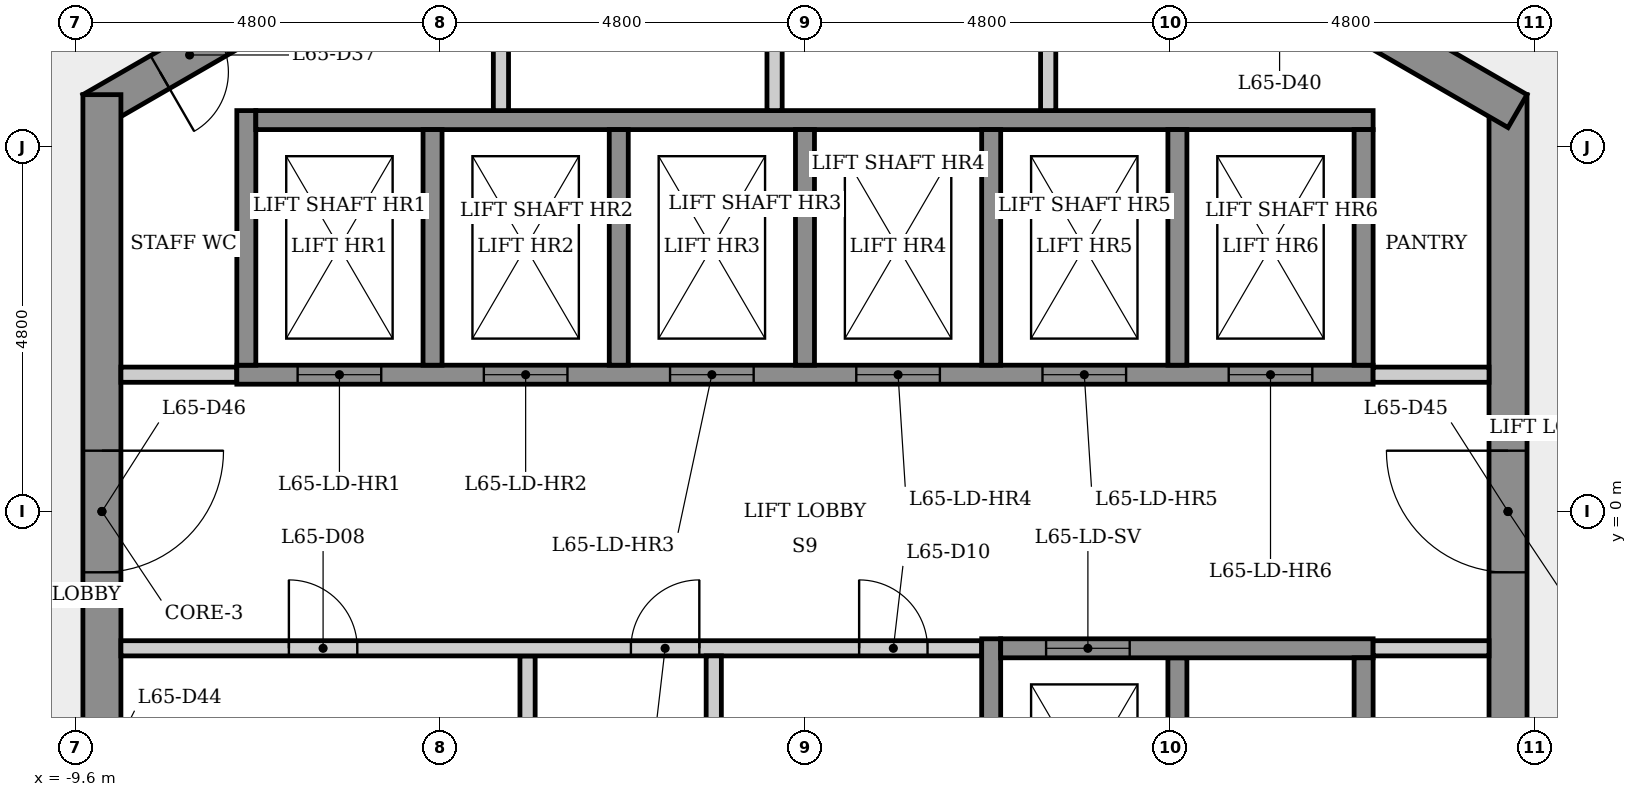
"""IFC4 building model, lengths in metres.
Left out: names, types, materials, properties, quantities, classifications, styles, units other than length and angle.
Written with IfcOpenShell. Run it as: python <this file> out.ifc"""

import sys

from ifc_helpers import new_model, si_unit, direction, frame, frame_2d, origin, place, context, subcontext, project, spatial, rectangle, extrude, element, fill, save


model = new_model("IFC4")
c1 = context("Model", 3, precision=1e-05, world=origin(), true_north=direction((0.0, 1.0)))
c2 = subcontext(c1, "Body", "Model", "MODEL_VIEW")
j1 = project(units=[si_unit("LENGTHUNIT", "METRE"), si_unit("PLANEANGLEUNIT", "RADIAN")], contexts=[c1])
p1 = place(None, origin())
s1 = spatial("IfcSite", under=j1, at=p1, CompositionType="ELEMENT")
p2 = place(p1, origin())
s2 = spatial("IfcBuilding", under=s1, at=p2, CompositionType="ELEMENT")
p3 = place(p2, frame((0.0, 0.0, 242.7)))
s3 = spatial("IfcBuildingStorey", under=s2, at=p3, CompositionType="ELEMENT", Elevation=242.7)
p4 = place(p3, frame((9.25, -5.485, 0.0), z_axis=(0.0, 0.0, 1.0), x_axis=(0.0, 1.0, 0.0)))
e1 = element("IfcWall", 1, at=p4, inside=s3, PredefinedType="SHEAR", context=c2, shape_type="SweptSolid", body=[
    extrude(rectangle(XDim=10.97, YDim=0.5, at=frame_2d((5.485, 0.0))), origin(), (0.0, 0.0, 1.0), 3.4),
])
p5 = place(p4, frame((4.685, 0.0, 0.0)))
e2 = element("IfcOpeningElement", 2, at=p5, cuts=e1, PredefinedType="OPENING", context=c2, shape_type="SweptSolid", body=[
    extrude(rectangle(XDim=1.6, YDim=2.1, at=frame_2d((0.8, 1.05))), frame((0.0, 0.26, 0.0), z_axis=(0.0, -1.0, 0.0), x_axis=(1.0, 0.0, 0.0)), (0.0, 0.0, 1.0), 0.52),
])
p6 = place(p3, frame((9.375, 5.268, 0.0), z_axis=(0.0, 0.0, 1.0), x_axis=(-0.866023993627, 0.500002442456, 0.0)))
e3 = element("IfcWall", 3, at=p6, inside=s3, PredefinedType="SHEAR", context=c2, shape_type="SweptSolid", body=[
    extrude(rectangle(XDim=10.97, YDim=0.5, at=frame_2d((5.485, 0.0))), origin(), (0.0, 0.0, 1.0), 3.4),
])
p7 = place(p6, frame((8.383, 0.0, 0.0)))
e4 = element("IfcOpeningElement", 4, at=p7, cuts=e3, PredefinedType="OPENING", context=c2, shape_type="SweptSolid", body=[
    extrude(rectangle(XDim=0.9, YDim=2.1, at=frame_2d((0.45, 1.05))), frame((0.0, 0.26, 0.0), z_axis=(0.0, -1.0, 0.0), x_axis=(1.0, 0.0, 0.0)), (0.0, 0.0, 1.0), 0.52),
])
p8 = place(p6, frame((3.165, 0.0, 0.0)))
e5 = element("IfcOpeningElement", 5, at=p8, cuts=e3, PredefinedType="OPENING", context=c2, shape_type="SweptSolid", body=[
    extrude(rectangle(XDim=0.9, YDim=2.1, at=frame_2d((0.45, 1.05))), frame((0.0, 0.26, 0.0), z_axis=(0.0, -1.0, 0.0), x_axis=(1.0, 0.0, 0.0)), (0.0, 0.0, 1.0), 0.52),
])
p9 = place(p3, frame((0.125, 10.753, 0.0), z_axis=(0.0, 0.0, 1.0), x_axis=(-0.866023993627, -0.500002442456, 0.0)))
e6 = element("IfcWall", 6, at=p9, inside=s3, PredefinedType="SHEAR", context=c2, shape_type="SweptSolid", body=[
    extrude(rectangle(XDim=10.97, YDim=0.5, at=frame_2d((5.485, 0.0))), origin(), (0.0, 0.0, 1.0), 3.4),
])
p10 = place(p9, frame((9.043, 0.0, 0.0)))
e7 = element("IfcOpeningElement", 7, at=p10, cuts=e6, PredefinedType="OPENING", context=c2, shape_type="SweptSolid", body=[
    extrude(rectangle(XDim=0.9, YDim=2.1, at=frame_2d((0.45, 1.05))), frame((0.0, 0.26, 0.0), z_axis=(0.0, -1.0, 0.0), x_axis=(1.0, 0.0, 0.0)), (0.0, 0.0, 1.0), 0.52),
])
p11 = place(p9, frame((2.38, 0.0, 0.0)))
e8 = element("IfcOpeningElement", 8, at=p11, cuts=e6, PredefinedType="OPENING", context=c2, shape_type="SweptSolid", body=[
    extrude(rectangle(XDim=0.9, YDim=2.1, at=frame_2d((0.45, 1.05))), frame((0.0, 0.26, 0.0), z_axis=(0.0, -1.0, 0.0), x_axis=(1.0, 0.0, 0.0)), (0.0, 0.0, 1.0), 0.52),
])
p12 = place(p3, frame((-9.25, 5.485, 0.0), z_axis=(0.0, 0.0, 1.0), x_axis=(0.0, -1.0, 0.0)))
e9 = element("IfcWall", 9, at=p12, inside=s3, PredefinedType="SHEAR", context=c2, shape_type="SweptSolid", body=[
    extrude(rectangle(XDim=10.97, YDim=0.5, at=frame_2d((5.485, 0.0))), origin(), (0.0, 0.0, 1.0), 3.4),
])
p13 = place(p12, frame((8.51, 0.0, 0.0)))
e10 = element("IfcOpeningElement", 10, at=p13, cuts=e9, PredefinedType="OPENING", context=c2, shape_type="SweptSolid", body=[
    extrude(rectangle(XDim=0.9, YDim=2.1, at=frame_2d((0.45, 1.05))), frame((0.0, 0.26, 0.0), z_axis=(0.0, -1.0, 0.0), x_axis=(1.0, 0.0, 0.0)), (0.0, 0.0, 1.0), 0.52),
])
p14 = place(p12, frame((4.685, 0.0, 0.0)))
e11 = element("IfcOpeningElement", 11, at=p14, cuts=e9, PredefinedType="OPENING", context=c2, shape_type="SweptSolid", body=[
    extrude(rectangle(XDim=1.6, YDim=2.1, at=frame_2d((0.8, 1.05))), frame((0.0, 0.26, 0.0), z_axis=(0.0, -1.0, 0.0), x_axis=(1.0, 0.0, 0.0)), (0.0, 0.0, 1.0), 0.52),
])
p15 = place(p3, frame((-9.0, 1.8, 0.0), z_axis=(0.0, 0.0, 1.0), x_axis=(1.0, 0.0, 0.0)))
e12 = element("IfcWall", 12, at=p15, inside=s3, PredefinedType="PARTITIONING", context=c2, shape_type="SweptSolid", body=[
    extrude(rectangle(XDim=1.525, YDim=0.2, at=frame_2d((0.763, 0.0))), origin(), (0.0, 0.0, 1.0), 3.05),
])
p16 = place(p3, frame((-7.475, 1.8, 0.0), z_axis=(0.0, 0.0, 1.0), x_axis=(1.0, 0.0, 0.0)))
e13 = element("IfcWall", 13, at=p16, inside=s3, PredefinedType="SHEAR", context=c2, shape_type="SweptSolid", body=[
    extrude(rectangle(XDim=14.95, YDim=0.25, at=frame_2d((7.475, 0.0))), origin(), (0.0, 0.0, 1.0), 3.05),
])
p17 = place(p16, frame((0.8, 0.0, 0.0)))
e14 = element("IfcOpeningElement", 14, at=p17, cuts=e13, PredefinedType="OPENING", context=c2, shape_type="SweptSolid", body=[
    extrude(rectangle(XDim=1.1, YDim=2.1, at=frame_2d((0.55, 1.05))), frame((0.0, 0.135, 0.0), z_axis=(0.0, -1.0, 0.0), x_axis=(1.0, 0.0, 0.0)), (0.0, 0.0, 1.0), 0.27),
])
p18 = place(p16, frame((3.25, 0.0, 0.0)))
e15 = element("IfcOpeningElement", 15, at=p18, cuts=e13, PredefinedType="OPENING", context=c2, shape_type="SweptSolid", body=[
    extrude(rectangle(XDim=1.1, YDim=2.1, at=frame_2d((0.55, 1.05))), frame((0.0, 0.135, 0.0), z_axis=(0.0, -1.0, 0.0), x_axis=(1.0, 0.0, 0.0)), (0.0, 0.0, 1.0), 0.27),
])
p19 = place(p16, frame((5.7, 0.0, 0.0)))
e16 = element("IfcOpeningElement", 16, at=p19, cuts=e13, PredefinedType="OPENING", context=c2, shape_type="SweptSolid", body=[
    extrude(rectangle(XDim=1.1, YDim=2.1, at=frame_2d((0.55, 1.05))), frame((0.0, 0.135, 0.0), z_axis=(0.0, -1.0, 0.0), x_axis=(1.0, 0.0, 0.0)), (0.0, 0.0, 1.0), 0.27),
])
p20 = place(p16, frame((8.15, 0.0, 0.0)))
e17 = element("IfcOpeningElement", 17, at=p20, cuts=e13, PredefinedType="OPENING", context=c2, shape_type="SweptSolid", body=[
    extrude(rectangle(XDim=1.1, YDim=2.1, at=frame_2d((0.55, 1.05))), frame((0.0, 0.135, 0.0), z_axis=(0.0, -1.0, 0.0), x_axis=(1.0, 0.0, 0.0)), (0.0, 0.0, 1.0), 0.27),
])
p21 = place(p16, frame((10.6, 0.0, 0.0)))
e18 = element("IfcOpeningElement", 18, at=p21, cuts=e13, PredefinedType="OPENING", context=c2, shape_type="SweptSolid", body=[
    extrude(rectangle(XDim=1.1, YDim=2.1, at=frame_2d((0.55, 1.05))), frame((0.0, 0.135, 0.0), z_axis=(0.0, -1.0, 0.0), x_axis=(1.0, 0.0, 0.0)), (0.0, 0.0, 1.0), 0.27),
])
p22 = place(p16, frame((13.05, 0.0, 0.0)))
e19 = element("IfcOpeningElement", 19, at=p22, cuts=e13, PredefinedType="OPENING", context=c2, shape_type="SweptSolid", body=[
    extrude(rectangle(XDim=1.1, YDim=2.1, at=frame_2d((0.55, 1.05))), frame((0.0, 0.135, 0.0), z_axis=(0.0, -1.0, 0.0), x_axis=(1.0, 0.0, 0.0)), (0.0, 0.0, 1.0), 0.27),
])
p23 = place(p3, frame((-7.35, 1.925, 0.0), z_axis=(0.0, 0.0, 1.0), x_axis=(0.0, 1.0, 0.0)))
e20 = element("IfcWall", 20, at=p23, inside=s3, PredefinedType="SHEAR", context=c2, shape_type="SweptSolid", body=[
    extrude(rectangle(XDim=3.35, YDim=0.25, at=frame_2d((1.675, 0.0))), origin(), (0.0, 0.0, 1.0), 3.05),
])
p24 = place(p3, frame((-7.225, 5.15, 0.0), z_axis=(0.0, 0.0, 1.0), x_axis=(1.0, 0.0, 0.0)))
e21 = element("IfcWall", 21, at=p24, inside=s3, PredefinedType="SHEAR", context=c2, shape_type="SweptSolid", body=[
    extrude(rectangle(XDim=14.7, YDim=0.25, at=frame_2d((7.35, 0.0))), origin(), (0.0, 0.0, 1.0), 3.05),
])
p25 = place(p3, frame((-4.9, 5.025, 0.0), z_axis=(0.0, 0.0, 1.0), x_axis=(0.0, -1.0, 0.0)))
e22 = element("IfcWall", 22, at=p25, inside=s3, PredefinedType="SHEAR", context=c2, shape_type="SweptSolid", body=[
    extrude(rectangle(XDim=3.1, YDim=0.25, at=frame_2d((1.55, 0.0))), origin(), (0.0, 0.0, 1.0), 3.4),
])
p26 = place(p3, frame((-4.0, 8.083, 0.0), z_axis=(0.0, 0.0, 1.0), x_axis=(0.0, -1.0, 0.0)))
e23 = element("IfcWall", 23, at=p26, inside=s3, PredefinedType="PARTITIONING", context=c2, shape_type="SweptSolid", body=[
    extrude(rectangle(XDim=2.808, YDim=0.2, at=frame_2d((1.404, 0.0))), origin(), (0.0, 0.0, 1.0), 3.05),
])
p27 = place(p3, frame((-3.65, -1.9, 0.0), z_axis=(0.0, 0.0, 1.0), x_axis=(0.0, -1.0, 0.0)))
e24 = element("IfcWall", 24, at=p27, inside=s3, PredefinedType="PARTITIONING", context=c2, shape_type="SweptSolid", body=[
    extrude(rectangle(XDim=3.15, YDim=0.2, at=frame_2d((1.575, 0.0))), origin(), (0.0, 0.0, 1.0), 3.05),
])
p28 = place(p3, frame((-9.0, -1.8, 0.0), z_axis=(0.0, 0.0, 1.0), x_axis=(1.0, 0.0, 0.0)))
e25 = element("IfcWall", 25, at=p28, inside=s3, PredefinedType="PARTITIONING", context=c2, shape_type="SweptSolid", body=[
    extrude(rectangle(XDim=11.325, YDim=0.2, at=frame_2d((5.663, 0.0))), origin(), (0.0, 0.0, 1.0), 3.05),
])
p29 = place(p28, frame((2.21, 0.0, 0.0)))
e26 = element("IfcOpeningElement", 26, at=p29, cuts=e25, PredefinedType="OPENING", context=c2, shape_type="SweptSolid", body=[
    extrude(rectangle(XDim=0.9, YDim=2.1, at=frame_2d((0.45, 1.05))), frame((0.0, 0.11, 0.0), z_axis=(0.0, -1.0, 0.0), x_axis=(1.0, 0.0, 0.0)), (0.0, 0.0, 1.0), 0.22),
])
p30 = place(p28, frame((6.71, 0.0, 0.0)))
e27 = element("IfcOpeningElement", 27, at=p30, cuts=e25, PredefinedType="OPENING", context=c2, shape_type="SweptSolid", body=[
    extrude(rectangle(XDim=0.9, YDim=2.1, at=frame_2d((0.45, 1.05))), frame((0.0, 0.11, 0.0), z_axis=(0.0, -1.0, 0.0), x_axis=(1.0, 0.0, 0.0)), (0.0, 0.0, 1.0), 0.22),
])
p31 = place(p28, frame((9.713, 0.0, 0.0)))
e28 = element("IfcOpeningElement", 28, at=p31, cuts=e25, PredefinedType="OPENING", context=c2, shape_type="SweptSolid", body=[
    extrude(rectangle(XDim=0.9, YDim=2.1, at=frame_2d((0.45, 1.05))), frame((0.0, 0.11, 0.0), z_axis=(0.0, -1.0, 0.0), x_axis=(1.0, 0.0, 0.0)), (0.0, 0.0, 1.0), 0.22),
])
p32 = place(p3, frame((-2.45, 5.025, 0.0), z_axis=(0.0, 0.0, 1.0), x_axis=(0.0, -1.0, 0.0)))
e29 = element("IfcWall", 29, at=p32, inside=s3, PredefinedType="SHEAR", context=c2, shape_type="SweptSolid", body=[
    extrude(rectangle(XDim=3.1, YDim=0.25, at=frame_2d((1.55, 0.0))), origin(), (0.0, 0.0, 1.0), 3.4),
])
p33 = place(p3, frame((-1.2, -1.9, 0.0), z_axis=(0.0, 0.0, 1.0), x_axis=(0.0, -1.0, 0.0)))
e30 = element("IfcWall", 30, at=p33, inside=s3, PredefinedType="PARTITIONING", context=c2, shape_type="SweptSolid", body=[
    extrude(rectangle(XDim=3.15, YDim=0.2, at=frame_2d((1.575, 0.0))), origin(), (0.0, 0.0, 1.0), 3.05),
])
p34 = place(p3, frame((-0.4, 10.161, 0.0), z_axis=(0.0, 0.0, 1.0), x_axis=(0.0, -1.0, 0.0)))
e31 = element("IfcWall", 31, at=p34, inside=s3, PredefinedType="PARTITIONING", context=c2, shape_type="SweptSolid", body=[
    extrude(rectangle(XDim=4.886, YDim=0.2, at=frame_2d((2.443, 0.0))), origin(), (0.0, 0.0, 1.0), 3.05),
])
p35 = place(p3, frame((0.0, 5.025, 0.0), z_axis=(0.0, 0.0, 1.0), x_axis=(0.0, -1.0, 0.0)))
e32 = element("IfcWall", 32, at=p35, inside=s3, PredefinedType="SHEAR", context=c2, shape_type="SweptSolid", body=[
    extrude(rectangle(XDim=3.1, YDim=0.25, at=frame_2d((1.55, 0.0))), origin(), (0.0, 0.0, 1.0), 3.4),
])
p36 = place(p3, frame((2.45, -5.275, 0.0), z_axis=(0.0, 0.0, 1.0), x_axis=(0.0, 1.0, 0.0)))
e33 = element("IfcWall", 33, at=p36, inside=s3, PredefinedType="SHEAR", context=c2, shape_type="SweptSolid", body=[
    extrude(rectangle(XDim=3.6, YDim=0.25, at=frame_2d((1.8, 0.0))), origin(), (0.0, 0.0, 1.0), 3.05),
])
p37 = place(p3, frame((2.45, 5.025, 0.0), z_axis=(0.0, 0.0, 1.0), x_axis=(0.0, -1.0, 0.0)))
e34 = element("IfcWall", 34, at=p37, inside=s3, PredefinedType="SHEAR", context=c2, shape_type="SweptSolid", body=[
    extrude(rectangle(XDim=3.1, YDim=0.25, at=frame_2d((1.55, 0.0))), origin(), (0.0, 0.0, 1.0), 3.4),
])
p38 = place(p3, frame((3.2, 8.545, 0.0), z_axis=(0.0, 0.0, 1.0), x_axis=(0.0, -1.0, 0.0)))
e35 = element("IfcWall", 35, at=p38, inside=s3, PredefinedType="PARTITIONING", context=c2, shape_type="SweptSolid", body=[
    extrude(rectangle(XDim=3.27, YDim=0.2, at=frame_2d((1.635, 0.0))), origin(), (0.0, 0.0, 1.0), 3.05),
])
for number, where, z_axis, x_axis in (
    (36, (4.9, -1.925, 0.0), (0.0, 0.0, 1.0), (0.0, -1.0, 0.0)),
    (37, (4.9, 5.025, 0.0), (0.0, 0.0, 1.0), (0.0, -1.0, 0.0)),
):
    element("IfcWall", number, at=place(p3, frame(where, z_axis=z_axis, x_axis=x_axis)), inside=s3, PredefinedType="SHEAR", context=c2, shape_type="SweptSolid", body=[
        extrude(rectangle(XDim=3.1, YDim=0.25, at=frame_2d((1.55, 0.0))), origin(), (0.0, 0.0, 1.0), 3.4),
    ])
p39 = place(p3, frame((2.575, -1.8, 0.0), z_axis=(0.0, 0.0, 1.0), x_axis=(1.0, 0.0, 0.0)))
e38 = element("IfcWall", 38, at=p39, inside=s3, PredefinedType="SHEAR", context=c2, shape_type="SweptSolid", body=[
    extrude(rectangle(XDim=4.9, YDim=0.25, at=frame_2d((2.45, 0.0))), origin(), (0.0, 0.0, 1.0), 3.05),
])
p40 = place(p39, frame((0.597, 0.0, 0.0)))
e39 = element("IfcOpeningElement", 39, at=p40, cuts=e38, PredefinedType="OPENING", context=c2, shape_type="SweptSolid", body=[
    extrude(rectangle(XDim=1.1, YDim=2.1, at=frame_2d((0.55, 1.05))), frame((0.0, 0.135, 0.0), z_axis=(0.0, -1.0, 0.0), x_axis=(1.0, 0.0, 0.0)), (0.0, 0.0, 1.0), 0.27),
])
p41 = place(p3, frame((7.475, 1.8, 0.0), z_axis=(0.0, 0.0, 1.0), x_axis=(1.0, 0.0, 0.0)))
e40 = element("IfcWall", 40, at=p41, inside=s3, PredefinedType="PARTITIONING", context=c2, shape_type="SweptSolid", body=[
    extrude(rectangle(XDim=1.525, YDim=0.2, at=frame_2d((0.763, 0.0))), origin(), (0.0, 0.0, 1.0), 3.05),
])
for number, where, z_axis, x_axis in (
    (41, (7.35, -1.925, 0.0), (0.0, 0.0, 1.0), (0.0, -1.0, 0.0)),
    (42, (7.35, 5.025, 0.0), (0.0, 0.0, 1.0), (0.0, -1.0, 0.0)),
):
    element("IfcWall", number, at=place(p3, frame(where, z_axis=z_axis, x_axis=x_axis)), inside=s3, PredefinedType="SHEAR", context=c2, shape_type="SweptSolid", body=[
        extrude(rectangle(XDim=3.1, YDim=0.25, at=frame_2d((1.55, 0.0))), origin(), (0.0, 0.0, 1.0), 3.4),
    ])
p42 = place(p3, frame((9.0, -1.8, 0.0), z_axis=(0.0, 0.0, 1.0), x_axis=(-1.0, 0.0, 0.0)))
e43 = element("IfcWall", 43, at=p42, inside=s3, PredefinedType="PARTITIONING", context=c2, shape_type="SweptSolid", body=[
    extrude(rectangle(XDim=1.525, YDim=0.2, at=frame_2d((0.763, 0.0))), origin(), (0.0, 0.0, 1.0), 3.05),
])
p43 = place(p17, origin())
e44 = element("IfcDoor", 44, at=p43, inside=s3, OperationType="SLIDING_TO_LEFT", PredefinedType="DOOR", context=c2, shape_type="SweptSolid", body=[
    extrude(rectangle(XDim=1.1, YDim=2.1, at=frame_2d((0.55, 1.05))), frame((0.0, 0.025, 0.0), z_axis=(0.0, -1.0, 0.0), x_axis=(1.0, 0.0, 0.0)), (0.0, 0.0, 1.0), 0.05),
])
fill(e14, e44)
p44 = place(p18, origin())
e45 = element("IfcDoor", 45, at=p44, inside=s3, OperationType="SLIDING_TO_LEFT", PredefinedType="DOOR", context=c2, shape_type="SweptSolid", body=[
    extrude(rectangle(XDim=1.1, YDim=2.1, at=frame_2d((0.55, 1.05))), frame((0.0, 0.025, 0.0), z_axis=(0.0, -1.0, 0.0), x_axis=(1.0, 0.0, 0.0)), (0.0, 0.0, 1.0), 0.05),
])
fill(e15, e45)
p45 = place(p19, origin())
e46 = element("IfcDoor", 46, at=p45, inside=s3, OperationType="SLIDING_TO_LEFT", PredefinedType="DOOR", context=c2, shape_type="SweptSolid", body=[
    extrude(rectangle(XDim=1.1, YDim=2.1, at=frame_2d((0.55, 1.05))), frame((0.0, 0.025, 0.0), z_axis=(0.0, -1.0, 0.0), x_axis=(1.0, 0.0, 0.0)), (0.0, 0.0, 1.0), 0.05),
])
fill(e16, e46)
p46 = place(p20, origin())
e47 = element("IfcDoor", 47, at=p46, inside=s3, OperationType="SLIDING_TO_LEFT", PredefinedType="DOOR", context=c2, shape_type="SweptSolid", body=[
    extrude(rectangle(XDim=1.1, YDim=2.1, at=frame_2d((0.55, 1.05))), frame((0.0, 0.025, 0.0), z_axis=(0.0, -1.0, 0.0), x_axis=(1.0, 0.0, 0.0)), (0.0, 0.0, 1.0), 0.05),
])
fill(e17, e47)
p47 = place(p21, origin())
e48 = element("IfcDoor", 48, at=p47, inside=s3, OperationType="SLIDING_TO_LEFT", PredefinedType="DOOR", context=c2, shape_type="SweptSolid", body=[
    extrude(rectangle(XDim=1.1, YDim=2.1, at=frame_2d((0.55, 1.05))), frame((0.0, 0.025, 0.0), z_axis=(0.0, -1.0, 0.0), x_axis=(1.0, 0.0, 0.0)), (0.0, 0.0, 1.0), 0.05),
])
fill(e18, e48)
p48 = place(p22, origin())
e49 = element("IfcDoor", 49, at=p48, inside=s3, OperationType="SLIDING_TO_LEFT", PredefinedType="DOOR", context=c2, shape_type="SweptSolid", body=[
    extrude(rectangle(XDim=1.1, YDim=2.1, at=frame_2d((0.55, 1.05))), frame((0.0, 0.025, 0.0), z_axis=(0.0, -1.0, 0.0), x_axis=(1.0, 0.0, 0.0)), (0.0, 0.0, 1.0), 0.05),
])
fill(e19, e49)
p49 = place(p40, origin())
e50 = element("IfcDoor", 50, at=p49, inside=s3, OperationType="SLIDING_TO_LEFT", PredefinedType="DOOR", context=c2, shape_type="SweptSolid", body=[
    extrude(rectangle(XDim=1.1, YDim=2.1, at=frame_2d((0.55, 1.05))), frame((0.0, 0.025, 0.0), z_axis=(0.0, -1.0, 0.0), x_axis=(1.0, 0.0, 0.0)), (0.0, 0.0, 1.0), 0.05),
])
fill(e39, e50)
p50 = place(p29, origin())
e51 = element("IfcDoor", 51, at=p50, inside=s3, OperationType="SINGLE_SWING_LEFT", PredefinedType="DOOR", context=c2, shape_type="SweptSolid", body=[
    extrude(rectangle(XDim=0.9, YDim=2.1, at=frame_2d((0.45, 1.05))), frame((0.0, 0.025, 0.0), z_axis=(0.0, -1.0, 0.0), x_axis=(1.0, 0.0, 0.0)), (0.0, 0.0, 1.0), 0.05),
])
fill(e26, e51)
p51 = place(p30, origin())
e52 = element("IfcDoor", 52, at=p51, inside=s3, OperationType="SINGLE_SWING_RIGHT", PredefinedType="DOOR", context=c2, shape_type="SweptSolid", body=[
    extrude(rectangle(XDim=0.9, YDim=2.1, at=frame_2d((0.45, 1.05))), frame((0.0, 0.025, 0.0), z_axis=(0.0, -1.0, 0.0), x_axis=(1.0, 0.0, 0.0)), (0.0, 0.0, 1.0), 0.05),
])
fill(e27, e52)
p52 = place(p31, origin())
e53 = element("IfcDoor", 53, at=p52, inside=s3, OperationType="SINGLE_SWING_LEFT", PredefinedType="DOOR", context=c2, shape_type="SweptSolid", body=[
    extrude(rectangle(XDim=0.9, YDim=2.1, at=frame_2d((0.45, 1.05))), frame((0.0, 0.025, 0.0), z_axis=(0.0, -1.0, 0.0), x_axis=(1.0, 0.0, 0.0)), (0.0, 0.0, 1.0), 0.05),
])
fill(e28, e53)
p53 = place(p10, origin())
e54 = element("IfcDoor", 54, at=p53, inside=s3, OperationType="SINGLE_SWING_RIGHT", PredefinedType="DOOR", context=c2, shape_type="SweptSolid", body=[
    extrude(rectangle(XDim=0.9, YDim=2.1, at=frame_2d((0.45, 1.05))), frame((0.0, 0.025, 0.0), z_axis=(0.0, -1.0, 0.0), x_axis=(1.0, 0.0, 0.0)), (0.0, 0.0, 1.0), 0.05),
])
fill(e7, e54)
p54 = place(p5, origin())
e55 = element("IfcDoor", 55, at=p54, inside=s3, OperationType="SINGLE_SWING_RIGHT", PredefinedType="DOOR", context=c2, shape_type="SweptSolid", body=[
    extrude(rectangle(XDim=1.6, YDim=2.1, at=frame_2d((0.8, 1.05))), frame((0.0, 0.025, 0.0), z_axis=(0.0, -1.0, 0.0), x_axis=(1.0, 0.0, 0.0)), (0.0, 0.0, 1.0), 0.05),
])
fill(e2, e55)
p55 = place(p14, origin())
e56 = element("IfcDoor", 56, at=p55, inside=s3, OperationType="SINGLE_SWING_LEFT", PredefinedType="DOOR", context=c2, shape_type="SweptSolid", body=[
    extrude(rectangle(XDim=1.6, YDim=2.1, at=frame_2d((0.8, 1.05))), frame((0.0, 0.025, 0.0), z_axis=(0.0, -1.0, 0.0), x_axis=(1.0, 0.0, 0.0)), (0.0, 0.0, 1.0), 0.05),
])
fill(e11, e56)
save(model, sys.argv[1])
